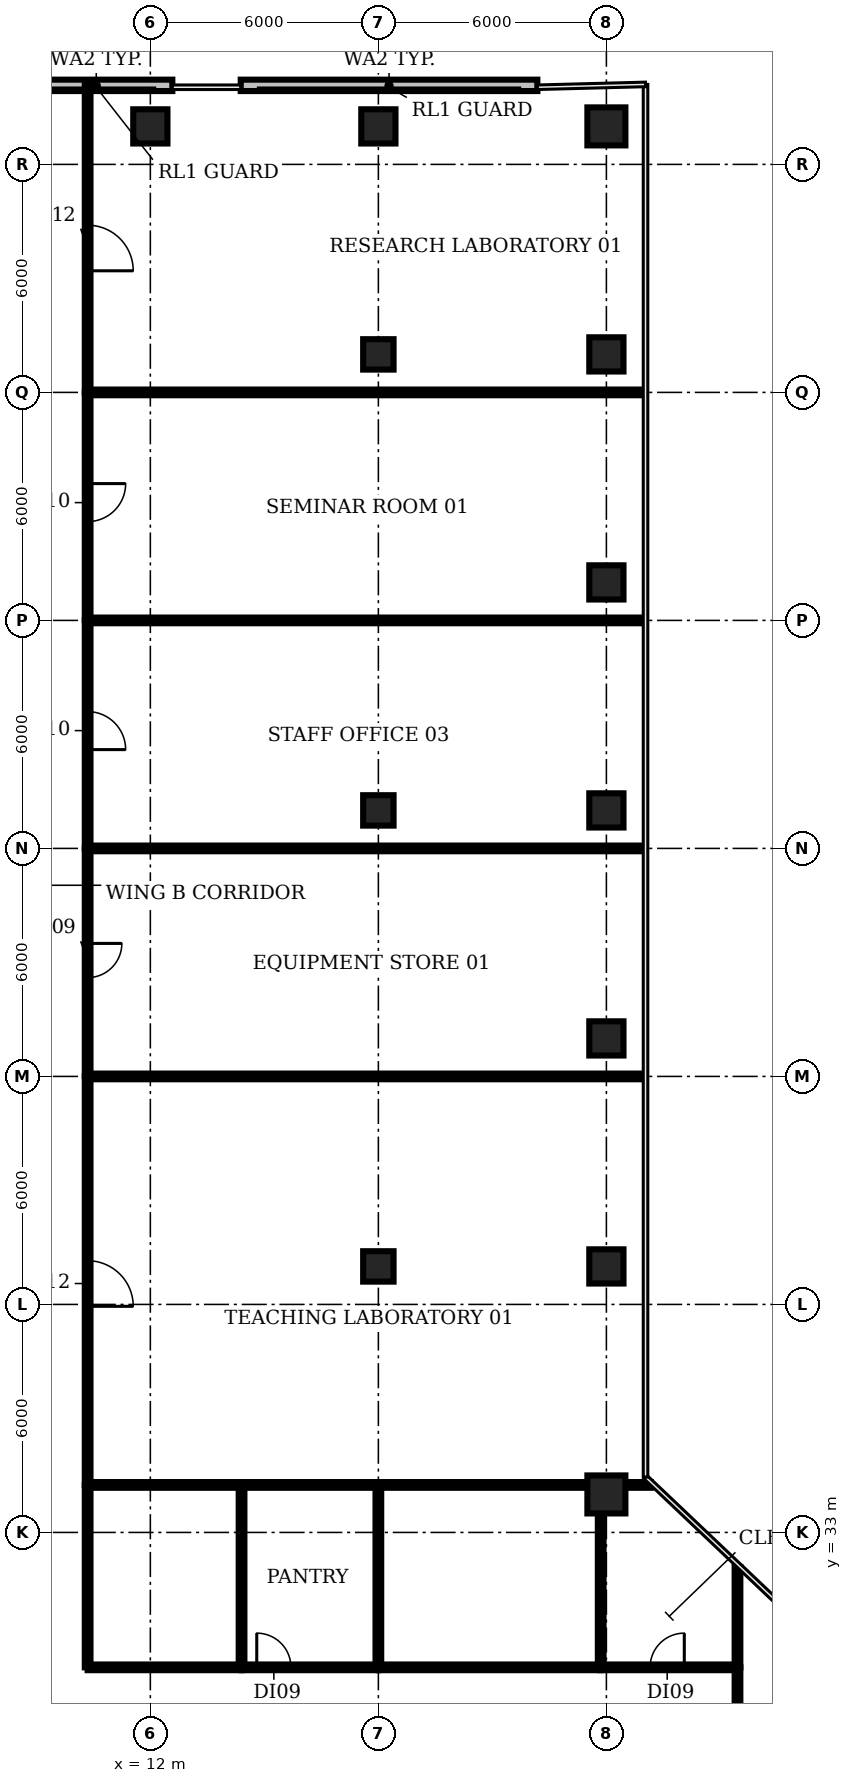
"""IFC4 building model, lengths in metres.
Left out: names, types, materials, properties, quantities, classifications, styles, units other than length and angle.
Written with IfcOpenShell. Run it as: python <this file> out.ifc"""

import sys

from ifc_helpers import new_model, si_unit, direction, frame, frame_2d, origin, origin_2d, place, context, subcontext, project, spatial, rectangle, circle, extrude, element, fill, save


model = new_model("IFC4")
c1 = context("Model", 3, precision=1e-05, world=origin(), true_north=direction((0.0, 1.0)))
c2 = subcontext(c1, "Body", "Model", "MODEL_VIEW")
j1 = project(units=[si_unit("LENGTHUNIT", "METRE"), si_unit("PLANEANGLEUNIT", "RADIAN")], contexts=[c1])
p1 = place(None, origin())
s1 = spatial("IfcSite", under=j1, at=p1, CompositionType="ELEMENT")
p2 = place(p1, origin())
s2 = spatial("IfcBuilding", under=s1, at=p2, CompositionType="ELEMENT")
p3 = place(p2, frame((0.0, 0.0, 104.6)))
s3 = spatial("IfcBuildingStorey", under=s2, at=p3, CompositionType="ELEMENT", Elevation=104.6)
p4 = place(p3, frame((12.0, 70.0, 0.0), z_axis=(0.0, 0.0, 1.0), x_axis=(1.0, 0.0, 0.0)))
e1 = element("IfcColumn", 1, at=p4, inside=s3, PredefinedType="COLUMN", context=c2, shape_type="SweptSolid", body=[
    extrude(rectangle(XDim=0.9, YDim=0.9, at=origin_2d()), origin(), (0.0, 0.0, 1.0), 3.85),
])
for number, where, z_axis, x_axis in (
    (2, (18.0, 40.0, 0.0), (0.0, 0.0, 1.0), (1.0, 0.0, 0.0)),
    (3, (18.0, 52.0, 0.0), (0.0, 0.0, 1.0), (1.0, 0.0, 0.0)),
    (4, (18.0, 64.0, 0.0), (0.0, 0.0, 1.0), (1.0, 0.0, 0.0)),
):
    element("IfcColumn", number, at=place(p3, frame(where, z_axis=z_axis, x_axis=x_axis)), inside=s3, PredefinedType="COLUMN", context=c2, shape_type="SweptSolid", body=[
        extrude(rectangle(XDim=0.8, YDim=0.8, at=origin_2d()), origin(), (0.0, 0.0, 1.0), 3.85),
    ])
p5 = place(p3, frame((18.0, 70.0, 0.0), z_axis=(0.0, 0.0, 1.0), x_axis=(1.0, 0.0, 0.0)))
e5 = element("IfcColumn", 5, at=p5, inside=s3, PredefinedType="COLUMN", context=c2, shape_type="SweptSolid", body=[
    extrude(rectangle(XDim=0.9, YDim=0.9, at=origin_2d()), origin(), (0.0, 0.0, 1.0), 3.85),
])
p6 = place(p3, frame((24.0, 34.0, 0.0), z_axis=(0.0, 0.0, 1.0), x_axis=(1.0, 0.0, 0.0)))
e6 = element("IfcColumn", 6, at=p6, inside=s3, PredefinedType="COLUMN", context=c2, shape_type="SweptSolid", body=[
    extrude(circle(Radius=0.5, at=origin_2d()), origin(), (0.0, 0.0, 1.0), 3.85),
])
for number, where, z_axis, x_axis in (
    (7, (24.0, 40.0, 0.0), (0.0, 0.0, 1.0), (1.0, 0.0, 0.0)),
    (8, (24.0, 46.0, 0.0), (0.0, 0.0, 1.0), (1.0, 0.0, 0.0)),
    (9, (24.0, 52.0, 0.0), (0.0, 0.0, 1.0), (1.0, 0.0, 0.0)),
    (10, (24.0, 58.0, 0.0), (0.0, 0.0, 1.0), (1.0, 0.0, 0.0)),
    (11, (24.0, 64.0, 0.0), (0.0, 0.0, 1.0), (1.0, 0.0, 0.0)),
):
    element("IfcColumn", number, at=place(p3, frame(where, z_axis=z_axis, x_axis=x_axis)), inside=s3, PredefinedType="COLUMN", context=c2, shape_type="SweptSolid", body=[
        extrude(rectangle(XDim=0.9, YDim=0.9, at=origin_2d()), origin(), (0.0, 0.0, 1.0), 3.85),
    ])
p7 = place(p3, frame((24.0, 70.0, 0.0), z_axis=(0.0, 0.0, 1.0), x_axis=(1.0, 0.0, 0.0)))
e12 = element("IfcColumn", 12, at=p7, inside=s3, PredefinedType="COLUMN", context=c2, shape_type="SweptSolid", body=[
    extrude(circle(Radius=0.5, at=origin_2d()), origin(), (0.0, 0.0, 1.0), 3.85),
])
p8 = place(p3, frame((22.183, 71.08, 0.0), z_axis=(0.0, 0.0, 1.0), x_axis=(-1.0, 0.0, 0.0)))
e13 = element("IfcWall", 13, at=p8, inside=s3, PredefinedType="SOLIDWALL", context=c2, shape_type="SweptSolid", body=[
    extrude(rectangle(XDim=7.805, YDim=0.3, at=frame_2d((3.902, 0.0))), origin(), (0.0, 0.0, 1.0), 3.85),
])
p9 = place(p3, frame((12.578, 71.08, 0.0), z_axis=(0.0, 0.0, 1.0), x_axis=(-1.0, 0.0, 0.0)))
e14 = element("IfcWall", 14, at=p9, inside=s3, PredefinedType="SOLIDWALL", context=c2, shape_type="SweptSolid", body=[
    extrude(rectangle(XDim=4.003, YDim=0.3, at=frame_2d((2.002, 0.0))), origin(), (0.0, 0.0, 1.0), 3.85),
])
p10 = place(p3, frame((10.35, 29.45, 0.0), z_axis=(0.0, 0.0, 1.0), x_axis=(0.0, 1.0, 0.0)))
e15 = element("IfcWall", 15, at=p10, inside=s3, PredefinedType="PARTITIONING", context=c2, shape_type="SweptSolid", body=[
    extrude(rectangle(XDim=4.8, YDim=0.15, at=frame_2d((2.4, 0.0))), origin(), (0.0, 0.0, 1.0), 2.83),
])
p11 = place(p3, frame((10.35, 29.45, 0.0), z_axis=(0.0, 0.0, 1.0), x_axis=(1.0, 0.0, 0.0)))
e16 = element("IfcWall", 16, at=p11, inside=s3, PredefinedType="PARTITIONING", context=c2, shape_type="SweptSolid", body=[
    extrude(rectangle(XDim=4.05, YDim=0.15, at=frame_2d((2.025, 0.0))), origin(), (0.0, 0.0, 1.0), 2.83),
])
p12 = place(p3, frame((10.35, 34.25, 0.0), z_axis=(0.0, 0.0, 1.0), x_axis=(1.0, 0.0, 0.0)))
e17 = element("IfcWall", 17, at=p12, inside=s3, PredefinedType="PARTITIONING", context=c2, shape_type="SweptSolid", body=[
    extrude(rectangle(XDim=14.82, YDim=0.15, at=frame_2d((7.41, 0.0))), origin(), (0.0, 0.0, 1.0), 2.83),
])
p13 = place(p3, frame((10.35, 45.0, 0.0), z_axis=(0.0, 0.0, 1.0), x_axis=(0.0, -1.0, 0.0)))
e18 = element("IfcWall", 18, at=p13, inside=s3, PredefinedType="PARTITIONING", context=c2, shape_type="SweptSolid", body=[
    extrude(rectangle(XDim=10.75, YDim=0.15, at=frame_2d((5.375, 0.0))), origin(), (0.0, 0.0, 1.0), 2.83),
])
p14 = place(p13, frame((4.85, 0.0, 0.0)))
e19 = element("IfcOpeningElement", 19, at=p14, cuts=e18, PredefinedType="OPENING", context=c2, shape_type="SweptSolid", body=[
    extrude(rectangle(XDim=1.2, YDim=2.1, at=frame_2d((0.6, 1.05))), frame((0.0, 0.085, 0.0), z_axis=(0.0, -1.0, 0.0), x_axis=(1.0, 0.0, 0.0)), (0.0, 0.0, 1.0), 0.17),
])
p15 = place(p3, frame((10.35, 45.0, 0.0), z_axis=(0.0, 0.0, 1.0), x_axis=(1.0, 0.0, 0.0)))
e20 = element("IfcWall", 20, at=p15, inside=s3, PredefinedType="PARTITIONING", context=c2, shape_type="SweptSolid", body=[
    extrude(rectangle(XDim=14.63, YDim=0.15, at=frame_2d((7.315, 0.0))), origin(), (0.0, 0.0, 1.0), 2.83),
])
p16 = place(p3, frame((10.35, 51.0, 0.0), z_axis=(0.0, 0.0, 1.0), x_axis=(0.0, -1.0, 0.0)))
e21 = element("IfcWall", 21, at=p16, inside=s3, PredefinedType="PARTITIONING", context=c2, shape_type="SweptSolid", body=[
    extrude(rectangle(XDim=6.0, YDim=0.15, at=frame_2d((3.0, 0.0))), origin(), (0.0, 0.0, 1.0), 2.83),
])
p17 = place(p16, frame((2.5, 0.0, 0.0)))
e22 = element("IfcOpeningElement", 22, at=p17, cuts=e21, PredefinedType="OPENING", context=c2, shape_type="SweptSolid", body=[
    extrude(rectangle(XDim=0.9, YDim=2.1, at=frame_2d((0.45, 1.05))), frame((0.0, 0.085, 0.0), z_axis=(0.0, -1.0, 0.0), x_axis=(1.0, 0.0, 0.0)), (0.0, 0.0, 1.0), 0.17),
])
p18 = place(p3, frame((10.35, 51.0, 0.0), z_axis=(0.0, 0.0, 1.0), x_axis=(1.0, 0.0, 0.0)))
e23 = element("IfcWall", 23, at=p18, inside=s3, PredefinedType="PARTITIONING", context=c2, shape_type="SweptSolid", body=[
    extrude(rectangle(XDim=14.63, YDim=0.15, at=frame_2d((7.315, 0.0))), origin(), (0.0, 0.0, 1.0), 2.83),
])
p19 = place(p3, frame((10.35, 57.0, 0.0), z_axis=(0.0, 0.0, 1.0), x_axis=(0.0, -1.0, 0.0)))
e24 = element("IfcWall", 24, at=p19, inside=s3, PredefinedType="PARTITIONING", context=c2, shape_type="SweptSolid", body=[
    extrude(rectangle(XDim=6.0, YDim=0.15, at=frame_2d((3.0, 0.0))), origin(), (0.0, 0.0, 1.0), 2.83),
])
p20 = place(p19, frame((2.4, 0.0, 0.0)))
e25 = element("IfcOpeningElement", 25, at=p20, cuts=e24, PredefinedType="OPENING", context=c2, shape_type="SweptSolid", body=[
    extrude(rectangle(XDim=1.0, YDim=2.1, at=frame_2d((0.5, 1.05))), frame((0.0, 0.085, 0.0), z_axis=(0.0, -1.0, 0.0), x_axis=(1.0, 0.0, 0.0)), (0.0, 0.0, 1.0), 0.17),
])
p21 = place(p3, frame((10.35, 57.0, 0.0), z_axis=(0.0, 0.0, 1.0), x_axis=(1.0, 0.0, 0.0)))
e26 = element("IfcWall", 26, at=p21, inside=s3, PredefinedType="PARTITIONING", context=c2, shape_type="SweptSolid", body=[
    extrude(rectangle(XDim=14.63, YDim=0.15, at=frame_2d((7.315, 0.0))), origin(), (0.0, 0.0, 1.0), 2.83),
])
p22 = place(p3, frame((10.35, 63.0, 0.0), z_axis=(0.0, 0.0, 1.0), x_axis=(0.0, -1.0, 0.0)))
e27 = element("IfcWall", 27, at=p22, inside=s3, PredefinedType="PARTITIONING", context=c2, shape_type="SweptSolid", body=[
    extrude(rectangle(XDim=6.0, YDim=0.15, at=frame_2d((3.0, 0.0))), origin(), (0.0, 0.0, 1.0), 2.83),
])
p23 = place(p22, frame((2.4, 0.0, 0.0)))
e28 = element("IfcOpeningElement", 28, at=p23, cuts=e27, PredefinedType="OPENING", context=c2, shape_type="SweptSolid", body=[
    extrude(rectangle(XDim=1.0, YDim=2.1, at=frame_2d((0.5, 1.05))), frame((0.0, 0.085, 0.0), z_axis=(0.0, -1.0, 0.0), x_axis=(1.0, 0.0, 0.0)), (0.0, 0.0, 1.0), 0.17),
])
p24 = place(p3, frame((10.35, 63.0, 0.0), z_axis=(0.0, 0.0, 1.0), x_axis=(1.0, 0.0, 0.0)))
e29 = element("IfcWall", 29, at=p24, inside=s3, PredefinedType="PARTITIONING", context=c2, shape_type="SweptSolid", body=[
    extrude(rectangle(XDim=14.63, YDim=0.15, at=frame_2d((7.315, 0.0))), origin(), (0.0, 0.0, 1.0), 2.83),
])
p25 = place(p3, frame((10.35, 71.09, 0.0), z_axis=(0.0, 0.0, 1.0), x_axis=(0.0, -1.0, 0.0)))
e30 = element("IfcWall", 30, at=p25, inside=s3, PredefinedType="PARTITIONING", context=c2, shape_type="SweptSolid", body=[
    extrude(rectangle(XDim=8.09, YDim=0.15, at=frame_2d((4.045, 0.0))), origin(), (0.0, 0.0, 1.0), 2.83),
])
p26 = place(p25, frame((3.69, 0.0, 0.0)))
e31 = element("IfcOpeningElement", 31, at=p26, cuts=e30, PredefinedType="OPENING", context=c2, shape_type="SweptSolid", body=[
    extrude(rectangle(XDim=1.2, YDim=2.1, at=frame_2d((0.6, 1.05))), frame((0.0, 0.085, 0.0), z_axis=(0.0, -1.0, 0.0), x_axis=(1.0, 0.0, 0.0)), (0.0, 0.0, 1.0), 0.17),
])
p27 = place(p3, frame((14.4, 29.45, 0.0), z_axis=(0.0, 0.0, 1.0), x_axis=(0.0, 1.0, 0.0)))
e32 = element("IfcWall", 32, at=p27, inside=s3, PredefinedType="PARTITIONING", context=c2, shape_type="SweptSolid", body=[
    extrude(rectangle(XDim=4.8, YDim=0.15, at=frame_2d((2.4, 0.0))), origin(), (0.0, 0.0, 1.0), 2.83),
])
p28 = place(p3, frame((14.4, 29.45, 0.0), z_axis=(0.0, 0.0, 1.0), x_axis=(1.0, 0.0, 0.0)))
e33 = element("IfcWall", 33, at=p28, inside=s3, PredefinedType="PARTITIONING", context=c2, shape_type="SweptSolid", body=[
    extrude(rectangle(XDim=3.6, YDim=0.15, at=frame_2d((1.8, 0.0))), origin(), (0.0, 0.0, 1.0), 2.83),
])
p29 = place(p28, frame((0.4, 0.0, 0.0)))
e34 = element("IfcOpeningElement", 34, at=p29, cuts=e33, PredefinedType="OPENING", context=c2, shape_type="SweptSolid", body=[
    extrude(rectangle(XDim=0.9, YDim=2.1, at=frame_2d((0.45, 1.05))), frame((0.0, 0.085, 0.0), z_axis=(0.0, -1.0, 0.0), x_axis=(1.0, 0.0, 0.0)), (0.0, 0.0, 1.0), 0.17),
])
p30 = place(p3, frame((18.0, 29.45, 0.0), z_axis=(0.0, 0.0, 1.0), x_axis=(0.0, 1.0, 0.0)))
e35 = element("IfcWall", 35, at=p30, inside=s3, PredefinedType="PARTITIONING", context=c2, shape_type="SweptSolid", body=[
    extrude(rectangle(XDim=4.8, YDim=0.15, at=frame_2d((2.4, 0.0))), origin(), (0.0, 0.0, 1.0), 2.83),
])
p31 = place(p3, frame((18.0, 29.45, 0.0), z_axis=(0.0, 0.0, 1.0), x_axis=(1.0, 0.0, 0.0)))
e36 = element("IfcWall", 36, at=p31, inside=s3, PredefinedType="PARTITIONING", context=c2, shape_type="SweptSolid", body=[
    extrude(rectangle(XDim=5.85, YDim=0.15, at=frame_2d((2.925, 0.0))), origin(), (0.0, 0.0, 1.0), 2.83),
])
p32 = place(p3, frame((23.85, 29.45, 0.0), z_axis=(0.0, 0.0, 1.0), x_axis=(0.0, 1.0, 0.0)))
e37 = element("IfcWall", 37, at=p32, inside=s3, PredefinedType="PARTITIONING", context=c2, shape_type="SweptSolid", body=[
    extrude(rectangle(XDim=4.8, YDim=0.15, at=frame_2d((2.4, 0.0))), origin(), (0.0, 0.0, 1.0), 2.83),
])
p33 = place(p3, frame((23.85, 29.45, 0.0), z_axis=(0.0, 0.0, 1.0), x_axis=(1.0, 0.0, 0.0)))
e38 = element("IfcWall", 38, at=p33, inside=s3, PredefinedType="PARTITIONING", context=c2, shape_type="SweptSolid", body=[
    extrude(rectangle(XDim=3.6, YDim=0.15, at=frame_2d((1.8, 0.0))), origin(), (0.0, 0.0, 1.0), 2.83),
])
p34 = place(p33, frame((1.3, 0.0, 0.0)))
e39 = element("IfcOpeningElement", 39, at=p34, cuts=e38, PredefinedType="OPENING", context=c2, shape_type="SweptSolid", body=[
    extrude(rectangle(XDim=0.9, YDim=2.1, at=frame_2d((0.45, 1.05))), frame((0.0, 0.085, 0.0), z_axis=(0.0, -1.0, 0.0), x_axis=(1.0, 0.0, 0.0)), (0.0, 0.0, 1.0), 0.17),
])
p35 = place(p3, frame((27.45, 25.6, 0.0), z_axis=(0.0, 0.0, 1.0), x_axis=(0.0, 1.0, 0.0)))
e40 = element("IfcWall", 40, at=p35, inside=s3, PredefinedType="PARTITIONING", context=c2, shape_type="SweptSolid", body=[
    extrude(rectangle(XDim=3.85, YDim=0.15, at=frame_2d((1.925, 0.0))), origin(), (0.0, 0.0, 1.0), 2.83),
])
p36 = place(p3, frame((27.45, 29.45, 0.0), z_axis=(0.0, 0.0, 1.0), x_axis=(0.0, 1.0, 0.0)))
e41 = element("IfcWall", 41, at=p36, inside=s3, PredefinedType="PARTITIONING", context=c2, shape_type="SweptSolid", body=[
    extrude(rectangle(XDim=2.64, YDim=0.15, at=frame_2d((1.32, 0.0))), origin(), (0.0, 0.0, 1.0), 2.83),
])
p37 = place(p14, origin())
e42 = element("IfcDoor", 42, at=p37, inside=s3, OperationType="SINGLE_SWING_RIGHT", PredefinedType="DOOR", context=c2, shape_type="SweptSolid", body=[
    extrude(rectangle(XDim=1.2, YDim=2.1, at=frame_2d((0.6, 1.05))), frame((0.0, 0.025, 0.0), z_axis=(0.0, -1.0, 0.0), x_axis=(1.0, 0.0, 0.0)), (0.0, 0.0, 1.0), 0.05),
])
fill(e19, e42)
p38 = place(p17, origin())
e43 = element("IfcDoor", 43, at=p38, inside=s3, OperationType="SINGLE_SWING_LEFT", PredefinedType="DOOR", context=c2, shape_type="SweptSolid", body=[
    extrude(rectangle(XDim=0.9, YDim=2.1, at=frame_2d((0.45, 1.05))), frame((0.0, 0.025, 0.0), z_axis=(0.0, -1.0, 0.0), x_axis=(1.0, 0.0, 0.0)), (0.0, 0.0, 1.0), 0.05),
])
fill(e22, e43)
p39 = place(p20, origin())
e44 = element("IfcDoor", 44, at=p39, inside=s3, OperationType="SINGLE_SWING_RIGHT", PredefinedType="DOOR", context=c2, shape_type="SweptSolid", body=[
    extrude(rectangle(XDim=1.0, YDim=2.1, at=frame_2d((0.5, 1.05))), frame((0.0, 0.025, 0.0), z_axis=(0.0, -1.0, 0.0), x_axis=(1.0, 0.0, 0.0)), (0.0, 0.0, 1.0), 0.05),
])
fill(e25, e44)
p40 = place(p23, origin())
e45 = element("IfcDoor", 45, at=p40, inside=s3, OperationType="SINGLE_SWING_LEFT", PredefinedType="DOOR", context=c2, shape_type="SweptSolid", body=[
    extrude(rectangle(XDim=1.0, YDim=2.1, at=frame_2d((0.5, 1.05))), frame((0.0, 0.025, 0.0), z_axis=(0.0, -1.0, 0.0), x_axis=(1.0, 0.0, 0.0)), (0.0, 0.0, 1.0), 0.05),
])
fill(e28, e45)
p41 = place(p26, origin())
e46 = element("IfcDoor", 46, at=p41, inside=s3, OperationType="SINGLE_SWING_RIGHT", PredefinedType="DOOR", context=c2, shape_type="SweptSolid", body=[
    extrude(rectangle(XDim=1.2, YDim=2.1, at=frame_2d((0.6, 1.05))), frame((0.0, 0.025, 0.0), z_axis=(0.0, -1.0, 0.0), x_axis=(1.0, 0.0, 0.0)), (0.0, 0.0, 1.0), 0.05),
])
fill(e31, e46)
p42 = place(p29, origin())
e47 = element("IfcDoor", 47, at=p42, inside=s3, OperationType="SINGLE_SWING_LEFT", PredefinedType="DOOR", context=c2, shape_type="SweptSolid", body=[
    extrude(rectangle(XDim=0.9, YDim=2.1, at=frame_2d((0.45, 1.05))), frame((0.0, 0.025, 0.0), z_axis=(0.0, -1.0, 0.0), x_axis=(1.0, 0.0, 0.0)), (0.0, 0.0, 1.0), 0.05),
])
fill(e34, e47)
p43 = place(p34, origin())
e48 = element("IfcDoor", 48, at=p43, inside=s3, OperationType="SINGLE_SWING_RIGHT", PredefinedType="DOOR", context=c2, shape_type="SweptSolid", body=[
    extrude(rectangle(XDim=0.9, YDim=2.1, at=frame_2d((0.45, 1.05))), frame((0.0, 0.025, 0.0), z_axis=(0.0, -1.0, 0.0), x_axis=(1.0, 0.0, 0.0)), (0.0, 0.0, 1.0), 0.05),
])
fill(e39, e48)
save(model, sys.argv[1])
